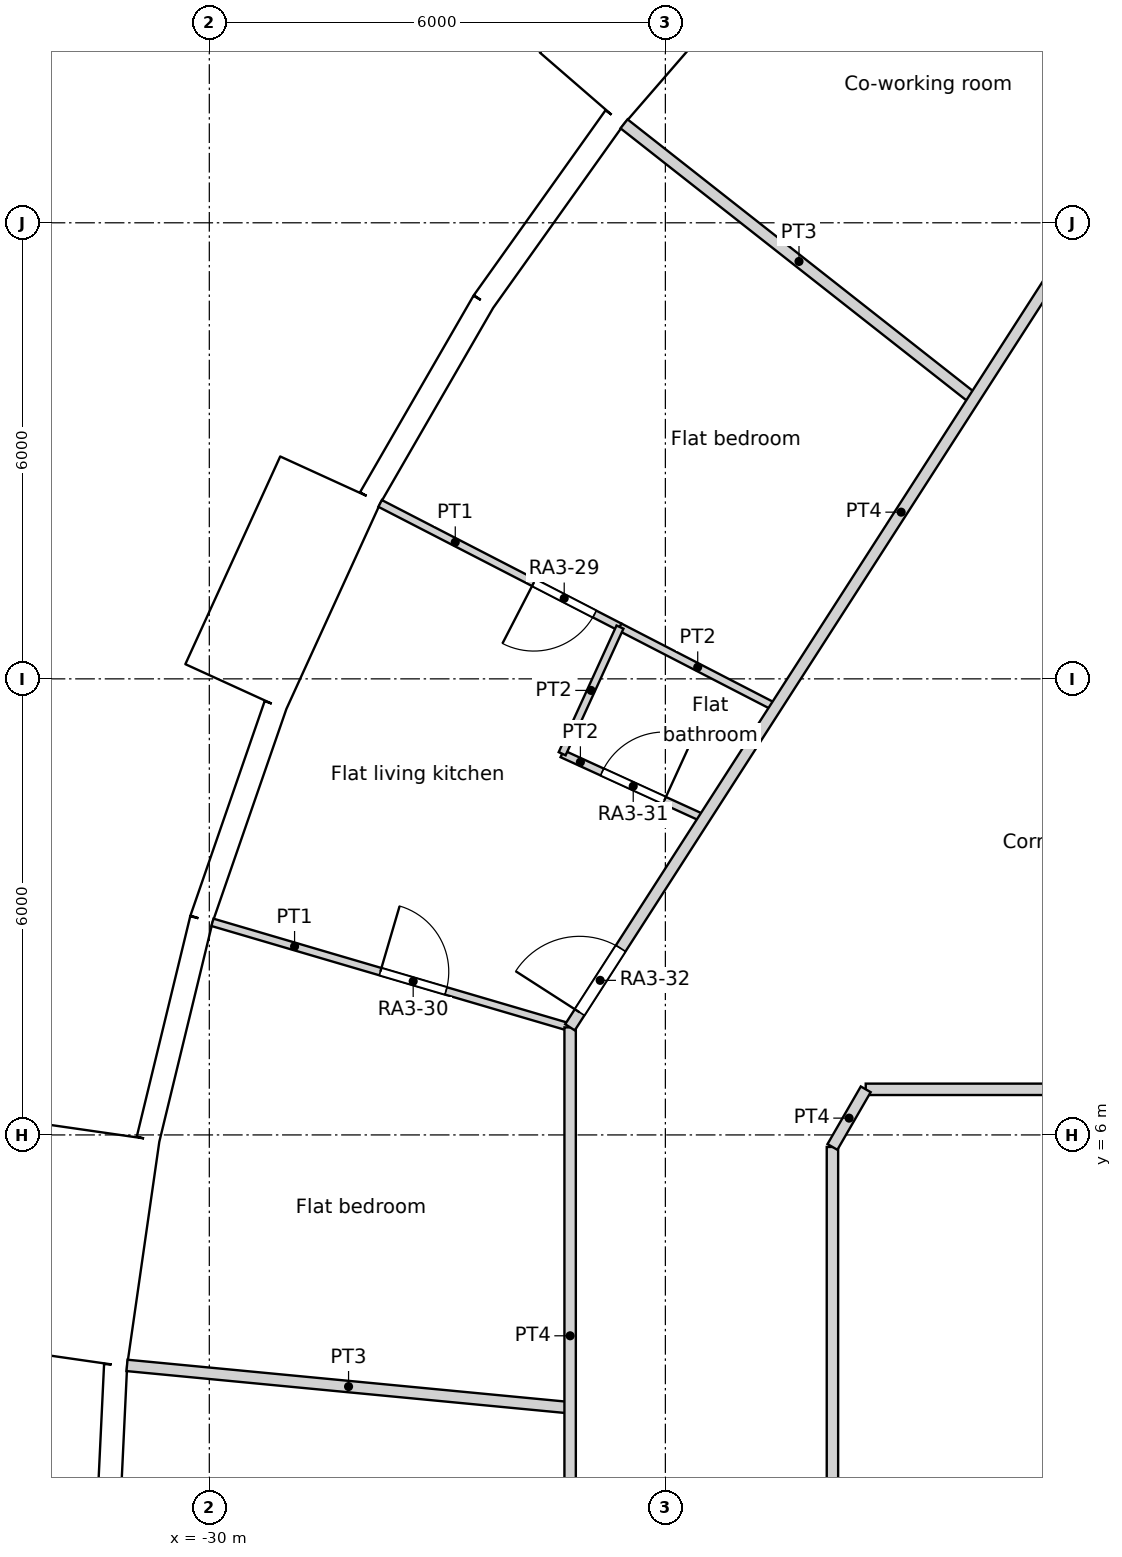
"""IFC4 building model, lengths in metres.
Left out: names, types, materials, properties, quantities, classifications, styles, units other than length and angle.
Written with IfcOpenShell. Run it as: python <this file> out.ifc"""

import sys

from ifc_helpers import new_model, si_unit, direction, frame, frame_2d, origin, origin_2d, place, context, subcontext, project, spatial, rectangle, circle, extrude, element, fill, save


model = new_model("IFC4")
c1 = context("Model", 3, precision=1e-05, world=origin(), true_north=direction((0.0, 1.0)))
c2 = subcontext(c1, "Body", "Model", "MODEL_VIEW")
j1 = project(units=[si_unit("LENGTHUNIT", "METRE"), si_unit("PLANEANGLEUNIT", "RADIAN")], contexts=[c1])
p1 = place(None, origin())
s1 = spatial("IfcSite", under=j1, at=p1, CompositionType="ELEMENT")
p2 = place(p1, origin())
s2 = spatial("IfcBuilding", under=s1, at=p2, CompositionType="ELEMENT")
p3 = place(p2, frame((0.0, 0.0, 49.8)))
s3 = spatial("IfcBuildingStorey", under=s2, at=p3, CompositionType="ELEMENT", Elevation=49.8)
for number, where, z_axis, x_axis in (
    (1, (-23.797, 18.715, 0.0), (0.0, 0.0, 1.0), (1.0, 0.0, 0.0)),
    (2, (-26.909, 13.873, 0.0), (0.0, 0.0, 1.0), (1.0, 0.0, 0.0)),
    (3, (-29.048, 8.529, 0.0), (0.0, 0.0, 1.0), (1.0, 0.0, 0.0)),
    (4, (-30.137, 2.878, 0.0), (0.0, 0.0, 1.0), (1.0, 0.0, 0.0)),
):
    element("IfcColumn", number, at=place(p3, frame(where, z_axis=z_axis, x_axis=x_axis)), inside=s3, PredefinedType="COLUMN", context=c2, shape_type="SweptSolid", body=[
        extrude(circle(Radius=0.7, at=origin_2d()), origin(), (0.0, 0.0, 1.0), 3.6),
    ])
for number, where, z_axis, x_axis in (
    (5, (-20.509, 13.489, 0.0), (0.0, 0.0, 1.0), (1.0, 0.0, 0.0)),
    (6, (-23.067, 8.396, 0.0), (0.0, 0.0, 1.0), (1.0, 0.0, 0.0)),
    (7, (-24.382, 2.85, 0.0), (0.0, 0.0, 1.0), (1.0, 0.0, 0.0)),
):
    element("IfcColumn", number, at=place(p3, frame(where, z_axis=z_axis, x_axis=x_axis)), inside=s3, PredefinedType="COLUMN", context=c2, shape_type="SweptSolid", body=[
        extrude(circle(Radius=0.75, at=origin_2d()), origin(), (0.0, 0.0, 1.0), 3.6),
    ])
p4 = place(p3, frame((-18.612, 2.805, 0.0), z_axis=(0.0, 0.0, 1.0), x_axis=(1.0, 0.0, 0.0)))
e8 = element("IfcColumn", 8, at=p4, inside=s3, PredefinedType="COLUMN", context=c2, shape_type="SweptSolid", body=[
    extrude(circle(Radius=0.8, at=origin_2d()), origin(), (0.0, 0.0, 1.0), 3.6),
])
p5 = place(p3, frame((-23.137, 22.033, -0.45), z_axis=(0.0, 0.0, 1.0), x_axis=(-0.654890259022, -0.75572398972, 0.0)))
e9 = element("IfcWall", 9, at=p5, inside=s3, PredefinedType="ELEMENTEDWALL", context=c2, shape_type="SweptSolid", body=[
    extrude(rectangle(XDim=3.0, YDim=1.45, at=frame_2d((1.5, 0.0))), origin(), (0.0, 0.0, 1.0), 3.6),
])
p6 = place(p5, frame((1.5, 0.0, 2.0)))
e10 = element("IfcOpeningElement", 10, at=p6, cuts=e9, PredefinedType="OPENING", context=c2, shape_type="SweptSolid", body=[
    extrude(circle(Radius=0.9, at=origin_2d()), frame((0.0, 0.735, 0.0), z_axis=(0.0, -1.0, 0.0), x_axis=(1.0, 0.0, 0.0)), (0.0, 0.0, 1.0), 1.47),
])
p7 = place(p3, frame((-24.666, 19.389, 0.0), z_axis=(0.0, 0.0, 1.0), x_axis=(-0.580059407678, -0.81457417315, 0.0)))
e11 = element("IfcWall", 11, at=p7, inside=s3, PredefinedType="SOLIDWALL", context=c2, shape_type="SweptSolid", body=[
    extrude(rectangle(XDim=2.979, YDim=0.3, at=frame_2d((1.49, 0.0))), origin(), (0.0, 0.0, 1.0), 3.15),
])
p8 = place(p7, frame((1.49, 0.0, 1.55)))
e12 = element("IfcOpeningElement", 12, at=p8, cuts=e11, PredefinedType="OPENING", context=c2, shape_type="SweptSolid", body=[
    extrude(circle(Radius=0.9, at=origin_2d()), frame((0.0, 0.16, 0.0), z_axis=(0.0, -1.0, 0.0), x_axis=(1.0, 0.0, 0.0)), (0.0, 0.0, 1.0), 0.32),
])
p9 = place(p3, frame((-26.394, 16.962, 0.0), z_axis=(0.0, 0.0, 1.0), x_axis=(-0.500025049464, -0.866010940986, 0.0)))
e13 = element("IfcWall", 13, at=p9, inside=s3, PredefinedType="SOLIDWALL", context=c2, shape_type="SweptSolid", body=[
    extrude(rectangle(XDim=2.98, YDim=0.3, at=frame_2d((1.49, 0.0))), origin(), (0.0, 0.0, 1.0), 3.15),
])
p10 = place(p9, frame((1.49, 0.0, 1.55)))
e14 = element("IfcOpeningElement", 14, at=p10, cuts=e13, PredefinedType="OPENING", context=c2, shape_type="SweptSolid", body=[
    extrude(circle(Radius=0.9, at=origin_2d()), frame((0.0, 0.16, 0.0), z_axis=(0.0, -1.0, 0.0), x_axis=(1.0, 0.0, 0.0)), (0.0, 0.0, 1.0), 0.32),
])
p11 = place(p3, frame((-28.407, 14.622, -0.45), z_axis=(0.0, 0.0, 1.0), x_axis=(-0.415427028395, -0.909626508012, 0.0)))
e15 = element("IfcWall", 15, at=p11, inside=s3, PredefinedType="ELEMENTEDWALL", context=c2, shape_type="SweptSolid", body=[
    extrude(rectangle(XDim=3.0, YDim=1.45, at=frame_2d((1.5, 0.0))), origin(), (0.0, 0.0, 1.0), 3.6),
])
p12 = place(p11, frame((1.5, 0.0, 2.0)))
e16 = element("IfcOpeningElement", 16, at=p12, cuts=e15, PredefinedType="OPENING", context=c2, shape_type="SweptSolid", body=[
    extrude(circle(Radius=0.9, at=origin_2d()), frame((0.0, 0.735, 0.0), z_axis=(0.0, -1.0, 0.0), x_axis=(1.0, 0.0, 0.0)), (0.0, 0.0, 1.0), 1.47),
])
p13 = place(p3, frame((-29.129, 11.655, 0.0), z_axis=(0.0, 0.0, 1.0), x_axis=(-0.327071167136, -0.944999709856, 0.0)))
e17 = element("IfcWall", 17, at=p13, inside=s3, PredefinedType="SOLIDWALL", context=c2, shape_type="SweptSolid", body=[
    extrude(rectangle(XDim=2.98, YDim=0.3, at=frame_2d((1.49, 0.0))), origin(), (0.0, 0.0, 1.0), 3.15),
])
p14 = place(p13, frame((1.49, 0.0, 1.55)))
e18 = element("IfcOpeningElement", 18, at=p14, cuts=e17, PredefinedType="OPENING", context=c2, shape_type="SweptSolid", body=[
    extrude(circle(Radius=0.9, at=origin_2d()), frame((0.0, 0.16, 0.0), z_axis=(0.0, -1.0, 0.0), x_axis=(1.0, 0.0, 0.0)), (0.0, 0.0, 1.0), 0.32),
])
p15 = place(p3, frame((-30.104, 8.839, 0.0), z_axis=(0.0, 0.0, 1.0), x_axis=(-0.235743081534, -0.971815414319, 0.0)))
e19 = element("IfcWall", 19, at=p15, inside=s3, PredefinedType="SOLIDWALL", context=c2, shape_type="SweptSolid", body=[
    extrude(rectangle(XDim=2.979, YDim=0.3, at=frame_2d((1.49, 0.0))), origin(), (0.0, 0.0, 1.0), 3.15),
])
p16 = place(p15, frame((1.49, 0.0, 1.55)))
e20 = element("IfcOpeningElement", 20, at=p16, cuts=e19, PredefinedType="OPENING", context=c2, shape_type="SweptSolid", body=[
    extrude(circle(Radius=0.9, at=origin_2d()), frame((0.0, 0.16, 0.0), z_axis=(0.0, -1.0, 0.0), x_axis=(1.0, 0.0, 0.0)), (0.0, 0.0, 1.0), 0.32),
])
p17 = place(p3, frame((-31.375, 6.027, -0.45), z_axis=(0.0, 0.0, 1.0), x_axis=(-0.142332746704, -0.989818866872, 0.0)))
e21 = element("IfcWall", 21, at=p17, inside=s3, PredefinedType="ELEMENTEDWALL", context=c2, shape_type="SweptSolid", body=[
    extrude(rectangle(XDim=3.0, YDim=1.45, at=frame_2d((1.5, 0.0))), origin(), (0.0, 0.0, 1.0), 3.6),
])
p18 = place(p17, frame((1.5, 0.0, 2.0)))
e22 = element("IfcOpeningElement", 22, at=p18, cuts=e21, PredefinedType="OPENING", context=c2, shape_type="SweptSolid", body=[
    extrude(circle(Radius=0.9, at=origin_2d()), frame((0.0, 0.735, 0.0), z_axis=(0.0, -1.0, 0.0), x_axis=(1.0, 0.0, 0.0)), (0.0, 0.0, 1.0), 1.47),
])
p19 = place(p3, frame((-31.233, 2.976, 0.0), z_axis=(0.0, 0.0, 1.0), x_axis=(-0.047604077644, -0.998866283239, 0.0)))
e23 = element("IfcWall", 23, at=p19, inside=s3, PredefinedType="SOLIDWALL", context=c2, shape_type="SweptSolid", body=[
    extrude(rectangle(XDim=2.98, YDim=0.3, at=frame_2d((1.49, 0.0))), origin(), (0.0, 0.0, 1.0), 3.15),
])
p20 = place(p19, frame((1.49, 0.0, 1.55)))
e24 = element("IfcOpeningElement", 24, at=p20, cuts=e23, PredefinedType="OPENING", context=c2, shape_type="SweptSolid", body=[
    extrude(circle(Radius=0.9, at=origin_2d()), frame((0.0, 0.16, 0.0), z_axis=(0.0, -1.0, 0.0), x_axis=(1.0, 0.0, 0.0)), (0.0, 0.0, 1.0), 0.32),
])
p21 = place(p3, frame((-25.255, 7.416, 0.0), z_axis=(0.0, 0.0, 1.0), x_axis=(0.540805851332, 0.841147449123, 0.0)))
e25 = element("IfcWall", 25, at=p21, inside=s3, PredefinedType="PARTITIONING", context=c2, shape_type="SweptSolid", body=[
    extrude(rectangle(XDim=14.829, YDim=0.15, at=frame_2d((7.415, 0.0))), origin(), (0.0, 0.0, 1.0), 3.15),
])
p22 = place(p21, frame((0.234, 0.0, 0.0)))
e26 = element("IfcOpeningElement", 26, at=p22, cuts=e25, PredefinedType="OPENING", context=c2, shape_type="SweptSolid", body=[
    extrude(rectangle(XDim=1.0, YDim=2.1, at=frame_2d((0.5, 1.05))), frame((0.0, 0.075, 0.0), z_axis=(0.0, -1.0, 0.0), x_axis=(1.0, 0.0, 0.0)), (0.0, 0.0, 1.0), 0.15),
])
p23 = place(p3, frame((-21.364, 6.6, 0.0), z_axis=(0.0, 0.0, 1.0), x_axis=(1.0, 0.0, 0.0)))
e27 = element("IfcWall", 27, at=p23, inside=s3, PredefinedType="PARTITIONING", context=c2, shape_type="SweptSolid", body=[
    extrude(rectangle(XDim=5.564, YDim=0.15, at=frame_2d((2.782, 0.0))), origin(), (0.0, 0.0, 1.0), 3.15),
])
p24 = place(p3, frame((-21.802, 5.842, 0.0), z_axis=(0.0, 0.0, 1.0), x_axis=(0.500277597875, 0.865865073245, 0.0)))
e28 = element("IfcWall", 28, at=p24, inside=s3, PredefinedType="PARTITIONING", context=c2, shape_type="SweptSolid", body=[
    extrude(rectangle(XDim=0.875, YDim=0.15, at=frame_2d((0.438, 0.0))), origin(), (0.0, 0.0, 1.0), 3.15),
])
p25 = place(p3, frame((-21.802, -5.842, 0.0), z_axis=(0.0, 0.0, 1.0), x_axis=(0.0, 1.0, 0.0)))
e29 = element("IfcWall", 29, at=p25, inside=s3, PredefinedType="PARTITIONING", context=c2, shape_type="SweptSolid", body=[
    extrude(rectangle(XDim=11.684, YDim=0.15, at=frame_2d((5.842, 0.0))), origin(), (0.0, 0.0, 1.0), 3.15),
])
p26 = place(p3, frame((-25.253, -7.415, 0.0), z_axis=(0.0, 0.0, 1.0), x_axis=(0.0, 1.0, 0.0)))
e30 = element("IfcWall", 30, at=p26, inside=s3, PredefinedType="PARTITIONING", context=c2, shape_type="SweptSolid", body=[
    extrude(rectangle(XDim=14.83, YDim=0.15, at=frame_2d((7.415, 0.0))), origin(), (0.0, 0.0, 1.0), 3.15),
])
p27 = place(p26, frame((5.665, 0.0, 0.0)))
e31 = element("IfcOpeningElement", 31, at=p27, cuts=e30, PredefinedType="OPENING", context=c2, shape_type="SweptSolid", body=[
    extrude(rectangle(XDim=1.0, YDim=2.04, at=frame_2d((0.5, 1.02))), frame((0.0, 0.075, 0.0), z_axis=(0.0, -1.0, 0.0), x_axis=(1.0, 0.0, 0.0)), (0.0, 0.0, 1.0), 0.15),
])
p28 = place(p3, frame((-24.544, 19.302, 0.0), z_axis=(0.0, 0.0, 1.0), x_axis=(0.786014513829, -0.618208042693, 0.0)))
e32 = element("IfcWall", 32, at=p28, inside=s3, PredefinedType="PARTITIONING", context=c2, shape_type="SweptSolid", body=[
    extrude(rectangle(XDim=5.857, YDim=0.15, at=frame_2d((2.929, 0.0))), origin(), (0.0, 0.0, 1.0), 3.15),
])
p29 = place(p3, frame((-27.753, 14.308, 0.0), z_axis=(0.0, 0.0, 1.0), x_axis=(0.888816732692, -0.45826282381, 0.0)))
e33 = element("IfcWall", 33, at=p29, inside=s3, PredefinedType="PARTITIONING", context=c2, shape_type="SweptSolid", body=[
    extrude(rectangle(XDim=3.551, YDim=0.1, at=frame_2d((1.775, 0.0))), origin(), (0.0, 0.0, 1.0), 3.15),
])
p30 = place(p29, frame((2.275, 0.0, 0.0)))
e34 = element("IfcOpeningElement", 34, at=p30, cuts=e33, PredefinedType="OPENING", context=c2, shape_type="SweptSolid", body=[
    extrude(rectangle(XDim=0.9, YDim=2.1, at=frame_2d((0.45, 1.05))), frame((0.0, 0.05, 0.0), z_axis=(0.0, -1.0, 0.0), x_axis=(1.0, 0.0, 0.0)), (0.0, 0.0, 1.0), 0.1),
])
p31 = place(p3, frame((-29.959, 8.797, 0.0), z_axis=(0.0, 0.0, 1.0), x_axis=(0.959478767209, -0.281780934902, 0.0)))
e35 = element("IfcWall", 35, at=p31, inside=s3, PredefinedType="PARTITIONING", context=c2, shape_type="SweptSolid", body=[
    extrude(rectangle(XDim=4.905, YDim=0.1, at=frame_2d((2.452, 0.0))), origin(), (0.0, 0.0, 1.0), 3.15),
])
p32 = place(p31, frame((2.303, 0.0, 0.0)))
e36 = element("IfcOpeningElement", 36, at=p32, cuts=e35, PredefinedType="OPENING", context=c2, shape_type="SweptSolid", body=[
    extrude(rectangle(XDim=0.9, YDim=2.1, at=frame_2d((0.45, 1.05))), frame((0.0, 0.05, 0.0), z_axis=(0.0, -1.0, 0.0), x_axis=(1.0, 0.0, 0.0)), (0.0, 0.0, 1.0), 0.1),
])
p33 = place(p3, frame((-25.358, 11.015, 0.0), z_axis=(0.0, 0.0, 1.0), x_axis=(0.415479380762, 0.909602596831, 0.0)))
e37 = element("IfcWall", 37, at=p33, inside=s3, PredefinedType="PARTITIONING", context=c2, shape_type="SweptSolid", body=[
    extrude(rectangle(XDim=1.832, YDim=0.1, at=frame_2d((0.916, 0.0))), origin(), (0.0, 0.0, 1.0), 3.15),
])
p34 = place(p3, frame((-25.358, 11.015, 0.0), z_axis=(0.0, 0.0, 1.0), x_axis=(0.909620690235, -0.415439766868, 0.0)))
e38 = element("IfcWall", 38, at=p34, inside=s3, PredefinedType="PARTITIONING", context=c2, shape_type="SweptSolid", body=[
    extrude(rectangle(XDim=2.056, YDim=0.1, at=frame_2d((1.028, 0.0))), origin(), (0.0, 0.0, 1.0), 3.15),
])
p35 = place(p34, frame((0.578, 0.0, 0.0)))
e39 = element("IfcOpeningElement", 39, at=p35, cuts=e38, PredefinedType="OPENING", context=c2, shape_type="SweptSolid", body=[
    extrude(rectangle(XDim=0.9, YDim=2.0, at=frame_2d((0.45, 1.0))), frame((0.0, 0.05, 0.0), z_axis=(0.0, -1.0, 0.0), x_axis=(1.0, 0.0, 0.0)), (0.0, 0.0, 1.0), 0.1),
])
p36 = place(p3, frame((-24.601, 12.683, 0.0), z_axis=(0.0, 0.0, 1.0), x_axis=(0.888712343697, -0.458465233317, 0.0)))
e40 = element("IfcWall", 40, at=p36, inside=s3, PredefinedType="PARTITIONING", context=c2, shape_type="SweptSolid", body=[
    extrude(rectangle(XDim=2.31, YDim=0.1, at=frame_2d((1.155, 0.0))), origin(), (0.0, 0.0, 1.0), 3.15),
])
p37 = place(p3, frame((-31.083, 2.968, 0.0), z_axis=(0.0, 0.0, 1.0), x_axis=(0.995465070325, -0.095127775983, 0.0)))
e41 = element("IfcWall", 41, at=p37, inside=s3, PredefinedType="PARTITIONING", context=c2, shape_type="SweptSolid", body=[
    extrude(rectangle(XDim=5.857, YDim=0.15, at=frame_2d((2.928, 0.0))), origin(), (0.0, 0.0, 1.0), 3.15),
])
p38 = place(p6, origin())
e42 = element("IfcWindow", 42, at=p38, inside=s3, PartitioningType="SINGLE_PANEL", PredefinedType="WINDOW", context=c2, shape_type="SweptSolid", body=[
    extrude(circle(Radius=0.9, at=origin_2d()), frame((0.0, 0.695, 0.0), z_axis=(0.0, -1.0, 0.0), x_axis=(1.0, 0.0, 0.0)), (0.0, 0.0, 1.0), 0.1),
])
fill(e10, e42)
p39 = place(p8, origin())
e43 = element("IfcWindow", 43, at=p39, inside=s3, PartitioningType="SINGLE_PANEL", PredefinedType="WINDOW", context=c2, shape_type="SweptSolid", body=[
    extrude(circle(Radius=0.9, at=origin_2d()), frame((0.0, 0.12, 0.0), z_axis=(0.0, -1.0, 0.0), x_axis=(1.0, 0.0, 0.0)), (0.0, 0.0, 1.0), 0.1),
])
fill(e12, e43)
p40 = place(p10, origin())
e44 = element("IfcWindow", 44, at=p40, inside=s3, PartitioningType="SINGLE_PANEL", PredefinedType="WINDOW", context=c2, shape_type="SweptSolid", body=[
    extrude(circle(Radius=0.9, at=origin_2d()), frame((0.0, 0.12, 0.0), z_axis=(0.0, -1.0, 0.0), x_axis=(1.0, 0.0, 0.0)), (0.0, 0.0, 1.0), 0.1),
])
fill(e14, e44)
p41 = place(p12, origin())
e45 = element("IfcWindow", 45, at=p41, inside=s3, PartitioningType="SINGLE_PANEL", PredefinedType="WINDOW", context=c2, shape_type="SweptSolid", body=[
    extrude(circle(Radius=0.9, at=origin_2d()), frame((0.0, 0.695, 0.0), z_axis=(0.0, -1.0, 0.0), x_axis=(1.0, 0.0, 0.0)), (0.0, 0.0, 1.0), 0.1),
])
fill(e16, e45)
p42 = place(p14, origin())
e46 = element("IfcWindow", 46, at=p42, inside=s3, PartitioningType="SINGLE_PANEL", PredefinedType="WINDOW", context=c2, shape_type="SweptSolid", body=[
    extrude(circle(Radius=0.9, at=origin_2d()), frame((0.0, 0.12, 0.0), z_axis=(0.0, -1.0, 0.0), x_axis=(1.0, 0.0, 0.0)), (0.0, 0.0, 1.0), 0.1),
])
fill(e18, e46)
p43 = place(p16, origin())
e47 = element("IfcWindow", 47, at=p43, inside=s3, PartitioningType="SINGLE_PANEL", PredefinedType="WINDOW", context=c2, shape_type="SweptSolid", body=[
    extrude(circle(Radius=0.9, at=origin_2d()), frame((0.0, 0.12, 0.0), z_axis=(0.0, -1.0, 0.0), x_axis=(1.0, 0.0, 0.0)), (0.0, 0.0, 1.0), 0.1),
])
fill(e20, e47)
p44 = place(p18, origin())
e48 = element("IfcWindow", 48, at=p44, inside=s3, PartitioningType="SINGLE_PANEL", PredefinedType="WINDOW", context=c2, shape_type="SweptSolid", body=[
    extrude(circle(Radius=0.9, at=origin_2d()), frame((0.0, 0.695, 0.0), z_axis=(0.0, -1.0, 0.0), x_axis=(1.0, 0.0, 0.0)), (0.0, 0.0, 1.0), 0.1),
])
fill(e22, e48)
p45 = place(p20, origin())
e49 = element("IfcWindow", 49, at=p45, inside=s3, PartitioningType="SINGLE_PANEL", PredefinedType="WINDOW", context=c2, shape_type="SweptSolid", body=[
    extrude(circle(Radius=0.9, at=origin_2d()), frame((0.0, 0.12, 0.0), z_axis=(0.0, -1.0, 0.0), x_axis=(1.0, 0.0, 0.0)), (0.0, 0.0, 1.0), 0.1),
])
fill(e24, e49)
p46 = place(p30, origin())
e50 = element("IfcDoor", 50, at=p46, inside=s3, OperationType="SINGLE_SWING_RIGHT", PredefinedType="DOOR", context=c2, shape_type="SweptSolid", body=[
    extrude(rectangle(XDim=0.9, YDim=2.1, at=frame_2d((0.45, 1.05))), frame((0.0, 0.025, 0.0), z_axis=(0.0, -1.0, 0.0), x_axis=(1.0, 0.0, 0.0)), (0.0, 0.0, 1.0), 0.05),
])
fill(e34, e50)
p47 = place(p32, origin())
e51 = element("IfcDoor", 51, at=p47, inside=s3, OperationType="SINGLE_SWING_LEFT", PredefinedType="DOOR", context=c2, shape_type="SweptSolid", body=[
    extrude(rectangle(XDim=0.9, YDim=2.1, at=frame_2d((0.45, 1.05))), frame((0.0, 0.025, 0.0), z_axis=(0.0, -1.0, 0.0), x_axis=(1.0, 0.0, 0.0)), (0.0, 0.0, 1.0), 0.05),
])
fill(e36, e51)
p48 = place(p35, origin())
e52 = element("IfcDoor", 52, at=p48, inside=s3, OperationType="SINGLE_SWING_RIGHT", PredefinedType="DOOR", context=c2, shape_type="SweptSolid", body=[
    extrude(rectangle(XDim=0.9, YDim=2.0, at=frame_2d((0.45, 1.0))), frame((0.0, 0.025, 0.0), z_axis=(0.0, -1.0, 0.0), x_axis=(1.0, 0.0, 0.0)), (0.0, 0.0, 1.0), 0.05),
])
fill(e39, e52)
p49 = place(p22, origin())
e53 = element("IfcDoor", 53, at=p49, inside=s3, OperationType="SINGLE_SWING_LEFT", PredefinedType="DOOR", context=c2, shape_type="SweptSolid", body=[
    extrude(rectangle(XDim=1.0, YDim=2.1, at=frame_2d((0.5, 1.05))), frame((0.0, 0.025, 0.0), z_axis=(0.0, -1.0, 0.0), x_axis=(1.0, 0.0, 0.0)), (0.0, 0.0, 1.0), 0.05),
])
fill(e26, e53)
save(model, sys.argv[1])
